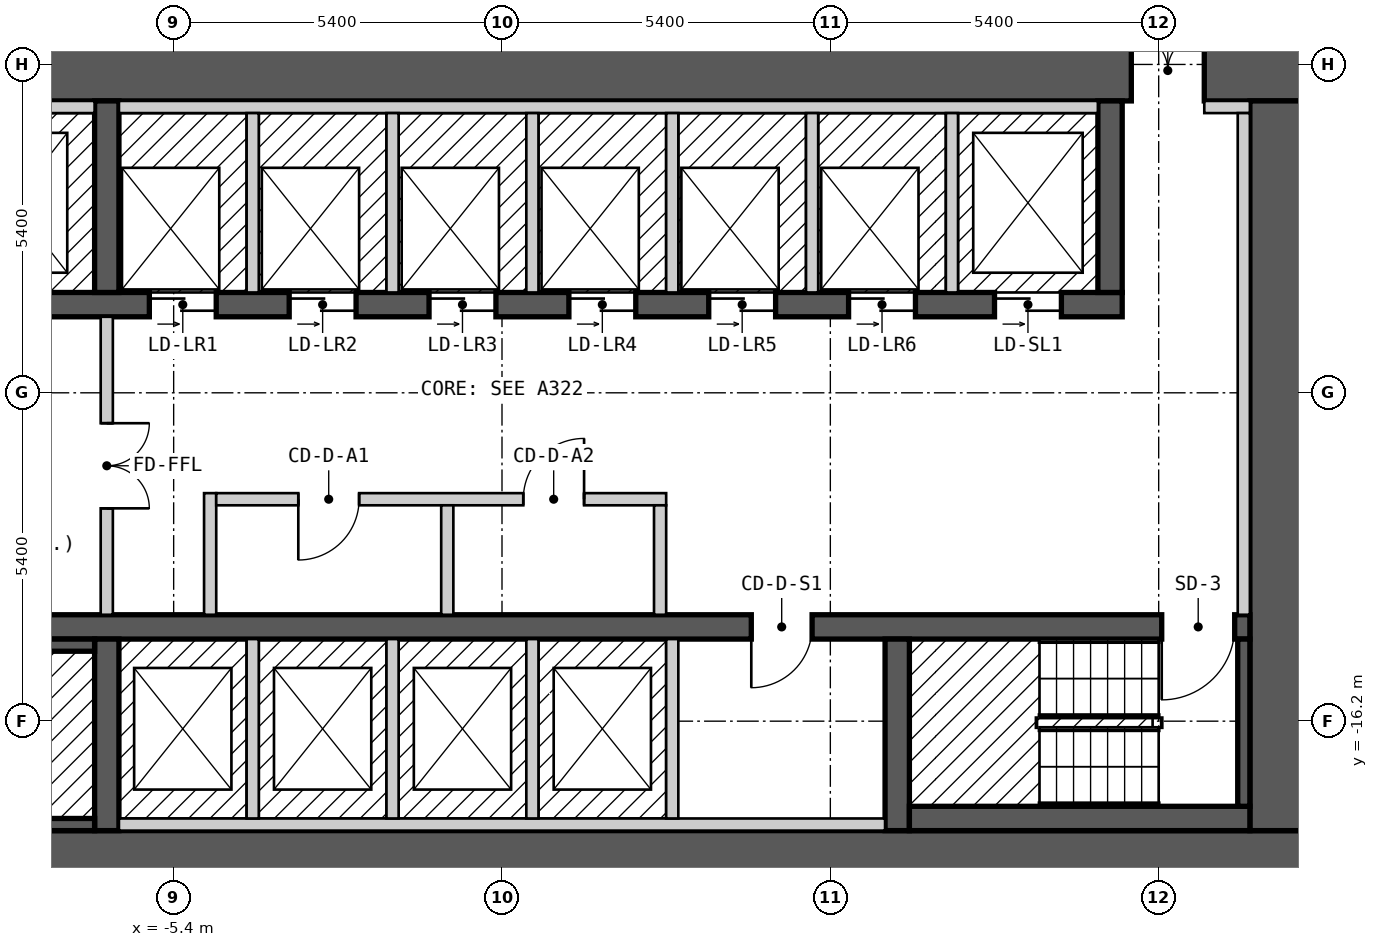
"""IFC4 building model, lengths in metres.
Left out: names, types, materials, properties, quantities, classifications, styles, units other than length and angle.
Written with IfcOpenShell. Run it as: python <this file> out.ifc"""

import sys

from ifc_helpers import new_model, si_unit, direction, frame, frame_2d, origin, place, context, subcontext, project, spatial, rectangle, extrude, element, fill, save


model = new_model("IFC4")
c1 = context("Model", 3, precision=1e-05, world=origin(), true_north=direction((0.0, 1.0)))
c2 = subcontext(c1, "Body", "Model", "MODEL_VIEW")
j1 = project(units=[si_unit("LENGTHUNIT", "METRE"), si_unit("PLANEANGLEUNIT", "RADIAN")], contexts=[c1])
p1 = place(None, origin())
s1 = spatial("IfcSite", under=j1, at=p1, CompositionType="ELEMENT")
p2 = place(p1, origin())
s2 = spatial("IfcBuilding", under=s1, at=p2, CompositionType="ELEMENT")
p3 = place(p2, frame((0.0, 0.0, 72.0)))
s3 = spatial("IfcBuildingStorey", under=s2, at=p3, CompositionType="ELEMENT", Elevation=72.0)
p4 = place(p3, frame((-13.3, -18.5, 0.0), z_axis=(0.0, 0.0, 1.0), x_axis=(1.0, 0.0, 0.0)))
e1 = element("IfcWall", 1, at=p4, inside=s3, PredefinedType="SHEAR", context=c2, shape_type="SweptSolid", body=[
    extrude(rectangle(XDim=26.6, YDim=1.0, at=frame_2d((13.3, 0.0))), origin(), (0.0, 0.0, 1.0), 2.7),
])
p5 = place(p3, frame((-13.3, -5.5, 0.0), z_axis=(0.0, 0.0, 1.0), x_axis=(1.0, 0.0, 0.0)))
e2 = element("IfcWall", 2, at=p5, inside=s3, PredefinedType="SHEAR", context=c2, shape_type="SweptSolid", body=[
    extrude(rectangle(XDim=26.6, YDim=1.0, at=frame_2d((13.3, 0.0))), origin(), (0.0, 0.0, 1.0), 2.7),
])
p6 = place(p5, frame((23.65, 0.0, 0.0)))
e3 = element("IfcOpeningElement", 3, at=p6, cuts=e2, PredefinedType="OPENING", context=c2, shape_type="SweptSolid", body=[
    extrude(rectangle(XDim=1.2, YDim=2.1, at=frame_2d((0.6, 1.05))), frame((0.0, 0.51, 0.0), z_axis=(0.0, -1.0, 0.0), x_axis=(1.0, 0.0, 0.0)), (0.0, 0.0, 1.0), 1.02),
])
p7 = place(p3, frame((12.8, -18.0, 0.0), z_axis=(0.0, 0.0, 1.0), x_axis=(0.0, 1.0, 0.0)))
e4 = element("IfcWall", 4, at=p7, inside=s3, PredefinedType="SHEAR", context=c2, shape_type="SweptSolid", body=[
    extrude(rectangle(XDim=12.0, YDim=1.0, at=frame_2d((6.0, 0.0))), origin(), (0.0, 0.0, 1.0), 2.7),
])
p8 = place(p3, frame((-12.3, -14.65, 0.0), z_axis=(0.0, 0.0, 1.0), x_axis=(1.0, 0.0, 0.0)))
e5 = element("IfcWall", 5, at=p8, inside=s3, PredefinedType="SHEAR", context=c2, shape_type="SweptSolid", body=[
    extrude(rectangle(XDim=24.6, YDim=0.4, at=frame_2d((12.3, 0.0))), origin(), (0.0, 0.0, 1.0), 2.7),
])
p9 = place(p8, frame((1.5, 0.0, 0.0), z_axis=(0.0, 0.0, 1.0), x_axis=(-1.0, 0.0, 0.0)))
e6 = element("IfcOpeningElement", 6, at=p9, cuts=e5, PredefinedType="OPENING", context=c2, shape_type="SweptSolid", body=[
    extrude(rectangle(XDim=1.2, YDim=2.1, at=frame_2d((0.6, 1.05))), frame((0.0, 0.21, 0.0), z_axis=(0.0, -1.0, 0.0), x_axis=(1.0, 0.0, 0.0)), (0.0, 0.0, 1.0), 0.42),
])
p10 = place(p8, frame((24.35, 0.0, 0.0), z_axis=(0.0, 0.0, 1.0), x_axis=(-1.0, 0.0, 0.0)))
e7 = element("IfcOpeningElement", 7, at=p10, cuts=e5, PredefinedType="OPENING", context=c2, shape_type="SweptSolid", body=[
    extrude(rectangle(XDim=1.2, YDim=2.1, at=frame_2d((0.6, 1.05))), frame((0.0, 0.21, 0.0), z_axis=(0.0, -1.0, 0.0), x_axis=(1.0, 0.0, 0.0)), (0.0, 0.0, 1.0), 0.42),
])
p11 = place(p8, frame((17.4, 0.0, 0.0), z_axis=(0.0, 0.0, 1.0), x_axis=(-1.0, 0.0, 0.0)))
e8 = element("IfcOpeningElement", 8, at=p11, cuts=e5, PredefinedType="OPENING", context=c2, shape_type="SweptSolid", body=[
    extrude(rectangle(XDim=1.0, YDim=2.1, at=frame_2d((0.5, 1.05))), frame((0.0, 0.21, 0.0), z_axis=(0.0, -1.0, 0.0), x_axis=(1.0, 0.0, 0.0)), (0.0, 0.0, 1.0), 0.42),
])
p12 = place(p3, frame((-12.3, -9.35, 0.0), z_axis=(0.0, 0.0, 1.0), x_axis=(1.0, 0.0, 0.0)))
e9 = element("IfcWall", 9, at=p12, inside=s3, PredefinedType="SHEAR", context=c2, shape_type="SweptSolid", body=[
    extrude(rectangle(XDim=22.5, YDim=0.4, at=frame_2d((11.25, 0.0))), origin(), (0.0, 0.0, 1.0), 2.7),
])
p13 = place(p12, frame((0.9, 0.0, 0.0)))
e10 = element("IfcOpeningElement", 10, at=p13, cuts=e9, PredefinedType="OPENING", context=c2, shape_type="SweptSolid", body=[
    extrude(rectangle(XDim=1.1, YDim=2.1, at=frame_2d((0.55, 1.05))), frame((0.0, 0.21, 0.0), z_axis=(0.0, -1.0, 0.0), x_axis=(1.0, 0.0, 0.0)), (0.0, 0.0, 1.0), 0.42),
])
p14 = place(p12, frame((3.7, 0.0, 0.0)))
e11 = element("IfcOpeningElement", 11, at=p14, cuts=e9, PredefinedType="OPENING", context=c2, shape_type="SweptSolid", body=[
    extrude(rectangle(XDim=1.1, YDim=2.1, at=frame_2d((0.55, 1.05))), frame((0.0, 0.21, 0.0), z_axis=(0.0, -1.0, 0.0), x_axis=(1.0, 0.0, 0.0)), (0.0, 0.0, 1.0), 0.42),
])
p15 = place(p12, frame((6.5, 0.0, 0.0)))
e12 = element("IfcOpeningElement", 12, at=p15, cuts=e9, PredefinedType="OPENING", context=c2, shape_type="SweptSolid", body=[
    extrude(rectangle(XDim=1.1, YDim=2.1, at=frame_2d((0.55, 1.05))), frame((0.0, 0.21, 0.0), z_axis=(0.0, -1.0, 0.0), x_axis=(1.0, 0.0, 0.0)), (0.0, 0.0, 1.0), 0.42),
])
p16 = place(p12, frame((8.8, 0.0, 0.0)))
e13 = element("IfcOpeningElement", 13, at=p16, cuts=e9, PredefinedType="OPENING", context=c2, shape_type="SweptSolid", body=[
    extrude(rectangle(XDim=1.1, YDim=2.1, at=frame_2d((0.55, 1.05))), frame((0.0, 0.21, 0.0), z_axis=(0.0, -1.0, 0.0), x_axis=(1.0, 0.0, 0.0)), (0.0, 0.0, 1.0), 0.42),
])
p17 = place(p12, frame((11.1, 0.0, 0.0)))
e14 = element("IfcOpeningElement", 14, at=p17, cuts=e9, PredefinedType="OPENING", context=c2, shape_type="SweptSolid", body=[
    extrude(rectangle(XDim=1.1, YDim=2.1, at=frame_2d((0.55, 1.05))), frame((0.0, 0.21, 0.0), z_axis=(0.0, -1.0, 0.0), x_axis=(1.0, 0.0, 0.0)), (0.0, 0.0, 1.0), 0.42),
])
p18 = place(p12, frame((13.4, 0.0, 0.0)))
e15 = element("IfcOpeningElement", 15, at=p18, cuts=e9, PredefinedType="OPENING", context=c2, shape_type="SweptSolid", body=[
    extrude(rectangle(XDim=1.1, YDim=2.1, at=frame_2d((0.55, 1.05))), frame((0.0, 0.21, 0.0), z_axis=(0.0, -1.0, 0.0), x_axis=(1.0, 0.0, 0.0)), (0.0, 0.0, 1.0), 0.42),
])
p19 = place(p12, frame((15.7, 0.0, 0.0)))
e16 = element("IfcOpeningElement", 16, at=p19, cuts=e9, PredefinedType="OPENING", context=c2, shape_type="SweptSolid", body=[
    extrude(rectangle(XDim=1.1, YDim=2.1, at=frame_2d((0.55, 1.05))), frame((0.0, 0.21, 0.0), z_axis=(0.0, -1.0, 0.0), x_axis=(1.0, 0.0, 0.0)), (0.0, 0.0, 1.0), 0.42),
])
p20 = place(p12, frame((18.0, 0.0, 0.0)))
e17 = element("IfcOpeningElement", 17, at=p20, cuts=e9, PredefinedType="OPENING", context=c2, shape_type="SweptSolid", body=[
    extrude(rectangle(XDim=1.1, YDim=2.1, at=frame_2d((0.55, 1.05))), frame((0.0, 0.21, 0.0), z_axis=(0.0, -1.0, 0.0), x_axis=(1.0, 0.0, 0.0)), (0.0, 0.0, 1.0), 0.42),
])
p21 = place(p12, frame((20.4, 0.0, 0.0)))
e18 = element("IfcOpeningElement", 18, at=p21, cuts=e9, PredefinedType="OPENING", context=c2, shape_type="SweptSolid", body=[
    extrude(rectangle(XDim=1.1, YDim=2.1, at=frame_2d((0.55, 1.05))), frame((0.0, 0.21, 0.0), z_axis=(0.0, -1.0, 0.0), x_axis=(1.0, 0.0, 0.0)), (0.0, 0.0, 1.0), 0.42),
])
for number, where, z_axis, x_axis in (
    (19, (-6.5, -18.0, 0.0), (0.0, 0.0, 1.0), (0.0, 1.0, 0.0)),
    (20, (6.5, -18.0, 0.0), (0.0, 0.0, 1.0), (0.0, 1.0, 0.0)),
    (21, (-6.5, -9.15, 0.0), (0.0, 0.0, 1.0), (0.0, 1.0, 0.0)),
    (22, (10.0, -9.15, 0.0), (0.0, 0.0, 1.0), (0.0, 1.0, 0.0)),
):
    element("IfcWall", number, at=place(p3, frame(where, z_axis=z_axis, x_axis=x_axis)), inside=s3, PredefinedType="SHEAR", context=c2, shape_type="SweptSolid", body=[
        extrude(rectangle(XDim=3.15, YDim=0.4, at=frame_2d((1.575, 0.0))), origin(), (0.0, 0.0, 1.0), 2.7),
    ])
for number, where, z_axis, x_axis in (
    (23, (-12.1, -17.9, 0.0), (0.0, 0.0, 1.0), (1.0, 0.0, 0.0)),
    (24, (-12.1, -6.1, 0.0), (0.0, 0.0, 1.0), (1.0, 0.0, 0.0)),
):
    element("IfcWall", number, at=place(p3, frame(where, z_axis=z_axis, x_axis=x_axis)), inside=s3, PredefinedType="SOLIDWALL", context=c2, shape_type="SweptSolid", body=[
        extrude(rectangle(XDim=5.4, YDim=0.2, at=frame_2d((2.7, 0.0))), origin(), (0.0, 0.0, 1.0), 2.7),
    ])
p22 = place(p3, frame((-10.8, -14.95, 0.0), z_axis=(0.0, 0.0, 1.0), x_axis=(1.0, 0.0, 0.0)))
e25 = element("IfcWall", 25, at=p22, inside=s3, PredefinedType="SOLIDWALL", context=c2, shape_type="SweptSolid", body=[
    extrude(rectangle(XDim=4.1, YDim=0.2, at=frame_2d((2.05, 0.0))), origin(), (0.0, 0.0, 1.0), 2.7),
])
p23 = place(p3, frame((-6.5, -14.45, 0.0), z_axis=(0.0, 0.0, 1.0), x_axis=(0.0, 1.0, 0.0)))
e26 = element("IfcWall", 26, at=p23, inside=s3, PredefinedType="PARTITIONING", context=c2, shape_type="SweptSolid", body=[
    extrude(rectangle(XDim=4.9, YDim=0.2, at=frame_2d((2.45, 0.0))), origin(), (0.0, 0.0, 1.0), 2.7),
])
p24 = place(p23, frame((3.15, 0.0, 0.0), z_axis=(0.0, 0.0, 1.0), x_axis=(-1.0, 0.0, 0.0)))
e27 = element("IfcOpeningElement", 27, at=p24, cuts=e26, PredefinedType="OPENING", context=c2, shape_type="SweptSolid", body=[
    extrude(rectangle(XDim=1.4, YDim=2.1, at=frame_2d((0.7, 1.05))), frame((0.0, 0.11, 0.0), z_axis=(0.0, -1.0, 0.0), x_axis=(1.0, 0.0, 0.0)), (0.0, 0.0, 1.0), 0.22),
])
p25 = place(p3, frame((-6.3, -17.9, 0.0), z_axis=(0.0, 0.0, 1.0), x_axis=(1.0, 0.0, 0.0)))
e28 = element("IfcWall", 28, at=p25, inside=s3, PredefinedType="SOLIDWALL", context=c2, shape_type="SweptSolid", body=[
    extrude(rectangle(XDim=12.6, YDim=0.2, at=frame_2d((6.3, 0.0))), origin(), (0.0, 0.0, 1.0), 2.7),
])
p26 = place(p3, frame((-6.3, -6.1, 0.0), z_axis=(0.0, 0.0, 1.0), x_axis=(1.0, 0.0, 0.0)))
e29 = element("IfcWall", 29, at=p26, inside=s3, PredefinedType="SOLIDWALL", context=c2, shape_type="SweptSolid", body=[
    extrude(rectangle(XDim=16.1, YDim=0.2, at=frame_2d((8.05, 0.0))), origin(), (0.0, 0.0, 1.0), 2.7),
])
p27 = place(p3, frame((-4.8, -14.45, 0.0), z_axis=(0.0, 0.0, 1.0), x_axis=(0.0, 1.0, 0.0)))
e30 = element("IfcWall", 30, at=p27, inside=s3, PredefinedType="PARTITIONING", context=c2, shape_type="SweptSolid", body=[
    extrude(rectangle(XDim=2.0, YDim=0.2, at=frame_2d((1.0, 0.0))), origin(), (0.0, 0.0, 1.0), 2.7),
])
p28 = place(p3, frame((-4.7, -12.55, 0.0), z_axis=(0.0, 0.0, 1.0), x_axis=(1.0, 0.0, 0.0)))
e31 = element("IfcWall", 31, at=p28, inside=s3, PredefinedType="PARTITIONING", context=c2, shape_type="SweptSolid", body=[
    extrude(rectangle(XDim=7.4, YDim=0.2, at=frame_2d((3.7, 0.0))), origin(), (0.0, 0.0, 1.0), 2.7),
])
p29 = place(p28, frame((2.35, 0.0, 0.0), z_axis=(0.0, 0.0, 1.0), x_axis=(-1.0, 0.0, 0.0)))
e32 = element("IfcOpeningElement", 32, at=p29, cuts=e31, PredefinedType="OPENING", context=c2, shape_type="SweptSolid", body=[
    extrude(rectangle(XDim=1.0, YDim=2.1, at=frame_2d((0.5, 1.05))), frame((0.0, 0.11, 0.0), z_axis=(0.0, -1.0, 0.0), x_axis=(1.0, 0.0, 0.0)), (0.0, 0.0, 1.0), 0.22),
])
p30 = place(p28, frame((6.05, 0.0, 0.0), z_axis=(0.0, 0.0, 1.0), x_axis=(-1.0, 0.0, 0.0)))
e33 = element("IfcOpeningElement", 33, at=p30, cuts=e31, PredefinedType="OPENING", context=c2, shape_type="SweptSolid", body=[
    extrude(rectangle(XDim=1.0, YDim=2.1, at=frame_2d((0.5, 1.05))), frame((0.0, 0.11, 0.0), z_axis=(0.0, -1.0, 0.0), x_axis=(1.0, 0.0, 0.0)), (0.0, 0.0, 1.0), 0.22),
])
for number, where, z_axis, x_axis in (
    (34, (-4.1, -17.8, 0.0), (0.0, 0.0, 1.0), (0.0, 1.0, 0.0)),
    (35, (-4.1, -9.15, 0.0), (0.0, 0.0, 1.0), (0.0, 1.0, 0.0)),
    (36, (-1.8, -17.8, 0.0), (0.0, 0.0, 1.0), (0.0, 1.0, 0.0)),
    (37, (-1.8, -9.15, 0.0), (0.0, 0.0, 1.0), (0.0, 1.0, 0.0)),
):
    element("IfcWall", number, at=place(p3, frame(where, z_axis=z_axis, x_axis=x_axis)), inside=s3, PredefinedType="SOLIDWALL", context=c2, shape_type="SweptSolid", body=[
        extrude(rectangle(XDim=2.95, YDim=0.2, at=frame_2d((1.475, 0.0))), origin(), (0.0, 0.0, 1.0), 2.7),
    ])
p31 = place(p3, frame((-0.9, -14.45, 0.0), z_axis=(0.0, 0.0, 1.0), x_axis=(0.0, 1.0, 0.0)))
e38 = element("IfcWall", 38, at=p31, inside=s3, PredefinedType="PARTITIONING", context=c2, shape_type="SweptSolid", body=[
    extrude(rectangle(XDim=1.8, YDim=0.2, at=frame_2d((0.9, 0.0))), origin(), (0.0, 0.0, 1.0), 2.7),
])
for number, where, z_axis, x_axis in (
    (39, (0.5, -17.8, 0.0), (0.0, 0.0, 1.0), (0.0, 1.0, 0.0)),
    (40, (0.5, -9.15, 0.0), (0.0, 0.0, 1.0), (0.0, 1.0, 0.0)),
):
    element("IfcWall", number, at=place(p3, frame(where, z_axis=z_axis, x_axis=x_axis)), inside=s3, PredefinedType="SOLIDWALL", context=c2, shape_type="SweptSolid", body=[
        extrude(rectangle(XDim=2.95, YDim=0.2, at=frame_2d((1.475, 0.0))), origin(), (0.0, 0.0, 1.0), 2.7),
    ])
p32 = place(p3, frame((2.6, -14.45, 0.0), z_axis=(0.0, 0.0, 1.0), x_axis=(0.0, 1.0, 0.0)))
e41 = element("IfcWall", 41, at=p32, inside=s3, PredefinedType="PARTITIONING", context=c2, shape_type="SweptSolid", body=[
    extrude(rectangle(XDim=1.8, YDim=0.2, at=frame_2d((0.9, 0.0))), origin(), (0.0, 0.0, 1.0), 2.7),
])
for number, where, z_axis, x_axis in (
    (42, (2.8, -17.8, 0.0), (0.0, 0.0, 1.0), (0.0, 1.0, 0.0)),
    (43, (2.8, -9.15, 0.0), (0.0, 0.0, 1.0), (0.0, 1.0, 0.0)),
    (44, (5.1, -9.15, 0.0), (0.0, 0.0, 1.0), (0.0, 1.0, 0.0)),
):
    element("IfcWall", number, at=place(p3, frame(where, z_axis=z_axis, x_axis=x_axis)), inside=s3, PredefinedType="SOLIDWALL", context=c2, shape_type="SweptSolid", body=[
        extrude(rectangle(XDim=2.95, YDim=0.2, at=frame_2d((1.475, 0.0))), origin(), (0.0, 0.0, 1.0), 2.7),
    ])
p33 = place(p3, frame((6.7, -17.8, 0.0), z_axis=(0.0, 0.0, 1.0), x_axis=(1.0, 0.0, 0.0)))
e45 = element("IfcWall", 45, at=p33, inside=s3, PredefinedType="SOLIDWALL", context=c2, shape_type="SweptSolid", body=[
    extrude(rectangle(XDim=5.6, YDim=0.4, at=frame_2d((2.8, 0.0))), origin(), (0.0, 0.0, 1.0), 2.7),
])
p34 = place(p3, frame((7.4, -9.15, 0.0), z_axis=(0.0, 0.0, 1.0), x_axis=(0.0, 1.0, 0.0)))
e46 = element("IfcWall", 46, at=p34, inside=s3, PredefinedType="SOLIDWALL", context=c2, shape_type="SweptSolid", body=[
    extrude(rectangle(XDim=2.95, YDim=0.2, at=frame_2d((1.475, 0.0))), origin(), (0.0, 0.0, 1.0), 2.7),
])
p35 = place(p3, frame((11.55, -6.1, 0.0), z_axis=(0.0, 0.0, 1.0), x_axis=(1.0, 0.0, 0.0)))
e47 = element("IfcWall", 47, at=p35, inside=s3, PredefinedType="PARTITIONING", context=c2, shape_type="SweptSolid", body=[
    extrude(rectangle(XDim=0.75, YDim=0.2, at=frame_2d((0.375, 0.0))), origin(), (0.0, 0.0, 1.0), 2.7),
])
p36 = place(p3, frame((12.2, -17.6, 0.0), z_axis=(0.0, 0.0, 1.0), x_axis=(0.0, 1.0, 0.0)))
e48 = element("IfcWall", 48, at=p36, inside=s3, PredefinedType="SOLIDWALL", context=c2, shape_type="SweptSolid", body=[
    extrude(rectangle(XDim=2.75, YDim=0.2, at=frame_2d((1.375, 0.0))), origin(), (0.0, 0.0, 1.0), 2.7),
])
p37 = place(p3, frame((12.2, -14.45, 0.0), z_axis=(0.0, 0.0, 1.0), x_axis=(0.0, 1.0, 0.0)))
e49 = element("IfcWall", 49, at=p37, inside=s3, PredefinedType="PARTITIONING", context=c2, shape_type="SweptSolid", body=[
    extrude(rectangle(XDim=8.25, YDim=0.2, at=frame_2d((4.125, 0.0))), origin(), (0.0, 0.0, 1.0), 2.7),
])
p38 = place(p15, origin())
e50 = element("IfcDoor", 50, at=p38, inside=s3, OperationType="DOUBLE_DOOR_SLIDING", PredefinedType="DOOR", context=c2, shape_type="SweptSolid", body=[
    extrude(rectangle(XDim=1.1, YDim=2.1, at=frame_2d((0.55, 1.05))), frame((0.0, 0.025, 0.0), z_axis=(0.0, -1.0, 0.0), x_axis=(1.0, 0.0, 0.0)), (0.0, 0.0, 1.0), 0.05),
])
fill(e12, e50)
p39 = place(p16, origin())
e51 = element("IfcDoor", 51, at=p39, inside=s3, OperationType="DOUBLE_DOOR_SLIDING", PredefinedType="DOOR", context=c2, shape_type="SweptSolid", body=[
    extrude(rectangle(XDim=1.1, YDim=2.1, at=frame_2d((0.55, 1.05))), frame((0.0, 0.025, 0.0), z_axis=(0.0, -1.0, 0.0), x_axis=(1.0, 0.0, 0.0)), (0.0, 0.0, 1.0), 0.05),
])
fill(e13, e51)
p40 = place(p17, origin())
e52 = element("IfcDoor", 52, at=p40, inside=s3, OperationType="DOUBLE_DOOR_SLIDING", PredefinedType="DOOR", context=c2, shape_type="SweptSolid", body=[
    extrude(rectangle(XDim=1.1, YDim=2.1, at=frame_2d((0.55, 1.05))), frame((0.0, 0.025, 0.0), z_axis=(0.0, -1.0, 0.0), x_axis=(1.0, 0.0, 0.0)), (0.0, 0.0, 1.0), 0.05),
])
fill(e14, e52)
p41 = place(p18, origin())
e53 = element("IfcDoor", 53, at=p41, inside=s3, OperationType="DOUBLE_DOOR_SLIDING", PredefinedType="DOOR", context=c2, shape_type="SweptSolid", body=[
    extrude(rectangle(XDim=1.1, YDim=2.1, at=frame_2d((0.55, 1.05))), frame((0.0, 0.025, 0.0), z_axis=(0.0, -1.0, 0.0), x_axis=(1.0, 0.0, 0.0)), (0.0, 0.0, 1.0), 0.05),
])
fill(e15, e53)
p42 = place(p19, origin())
e54 = element("IfcDoor", 54, at=p42, inside=s3, OperationType="DOUBLE_DOOR_SLIDING", PredefinedType="DOOR", context=c2, shape_type="SweptSolid", body=[
    extrude(rectangle(XDim=1.1, YDim=2.1, at=frame_2d((0.55, 1.05))), frame((0.0, 0.025, 0.0), z_axis=(0.0, -1.0, 0.0), x_axis=(1.0, 0.0, 0.0)), (0.0, 0.0, 1.0), 0.05),
])
fill(e16, e54)
p43 = place(p20, origin())
e55 = element("IfcDoor", 55, at=p43, inside=s3, OperationType="DOUBLE_DOOR_SLIDING", PredefinedType="DOOR", context=c2, shape_type="SweptSolid", body=[
    extrude(rectangle(XDim=1.1, YDim=2.1, at=frame_2d((0.55, 1.05))), frame((0.0, 0.025, 0.0), z_axis=(0.0, -1.0, 0.0), x_axis=(1.0, 0.0, 0.0)), (0.0, 0.0, 1.0), 0.05),
])
fill(e17, e55)
p44 = place(p21, origin())
e56 = element("IfcDoor", 56, at=p44, inside=s3, OperationType="DOUBLE_DOOR_SLIDING", PredefinedType="DOOR", context=c2, shape_type="SweptSolid", body=[
    extrude(rectangle(XDim=1.1, YDim=2.1, at=frame_2d((0.55, 1.05))), frame((0.0, 0.025, 0.0), z_axis=(0.0, -1.0, 0.0), x_axis=(1.0, 0.0, 0.0)), (0.0, 0.0, 1.0), 0.05),
])
fill(e18, e56)
p45 = place(p10, origin())
e57 = element("IfcDoor", 57, at=p45, inside=s3, OperationType="SINGLE_SWING_RIGHT", PredefinedType="DOOR", context=c2, shape_type="SweptSolid", body=[
    extrude(rectangle(XDim=1.2, YDim=2.1, at=frame_2d((0.6, 1.05))), frame((0.0, 0.025, 0.0), z_axis=(0.0, -1.0, 0.0), x_axis=(1.0, 0.0, 0.0)), (0.0, 0.0, 1.0), 0.05),
])
fill(e7, e57)
p46 = place(p24, origin())
e58 = element("IfcDoor", 58, at=p46, inside=s3, OperationType="DOUBLE_DOOR_SINGLE_SWING", PredefinedType="DOOR", context=c2, shape_type="SweptSolid", body=[
    extrude(rectangle(XDim=1.4, YDim=2.1, at=frame_2d((0.7, 1.05))), frame((0.0, 0.025, 0.0), z_axis=(0.0, -1.0, 0.0), x_axis=(1.0, 0.0, 0.0)), (0.0, 0.0, 1.0), 0.05),
])
fill(e27, e58)
p47 = place(p6, origin())
e59 = element("IfcDoor", 59, at=p47, inside=s3, OperationType="DOUBLE_DOOR_SINGLE_SWING", PredefinedType="DOOR", context=c2, shape_type="SweptSolid", body=[
    extrude(rectangle(XDim=1.2, YDim=2.1, at=frame_2d((0.6, 1.05))), frame((0.0, 0.025, 0.0), z_axis=(0.0, -1.0, 0.0), x_axis=(1.0, 0.0, 0.0)), (0.0, 0.0, 1.0), 0.05),
])
fill(e3, e59)
p48 = place(p29, origin())
e60 = element("IfcDoor", 60, at=p48, inside=s3, OperationType="SINGLE_SWING_RIGHT", PredefinedType="DOOR", context=c2, shape_type="SweptSolid", body=[
    extrude(rectangle(XDim=1.0, YDim=2.1, at=frame_2d((0.5, 1.05))), frame((0.0, 0.025, 0.0), z_axis=(0.0, -1.0, 0.0), x_axis=(1.0, 0.0, 0.0)), (0.0, 0.0, 1.0), 0.05),
])
fill(e32, e60)
p49 = place(p30, origin())
e61 = element("IfcDoor", 61, at=p49, inside=s3, OperationType="SINGLE_SWING_LEFT", PredefinedType="DOOR", context=c2, shape_type="SweptSolid", body=[
    extrude(rectangle(XDim=1.0, YDim=2.1, at=frame_2d((0.5, 1.05))), frame((0.0, 0.025, 0.0), z_axis=(0.0, -1.0, 0.0), x_axis=(1.0, 0.0, 0.0)), (0.0, 0.0, 1.0), 0.05),
])
fill(e33, e61)
p50 = place(p11, origin())
e62 = element("IfcDoor", 62, at=p50, inside=s3, OperationType="SINGLE_SWING_RIGHT", PredefinedType="DOOR", context=c2, shape_type="SweptSolid", body=[
    extrude(rectangle(XDim=1.0, YDim=2.1, at=frame_2d((0.5, 1.05))), frame((0.0, 0.025, 0.0), z_axis=(0.0, -1.0, 0.0), x_axis=(1.0, 0.0, 0.0)), (0.0, 0.0, 1.0), 0.05),
])
fill(e8, e62)
save(model, sys.argv[1])
